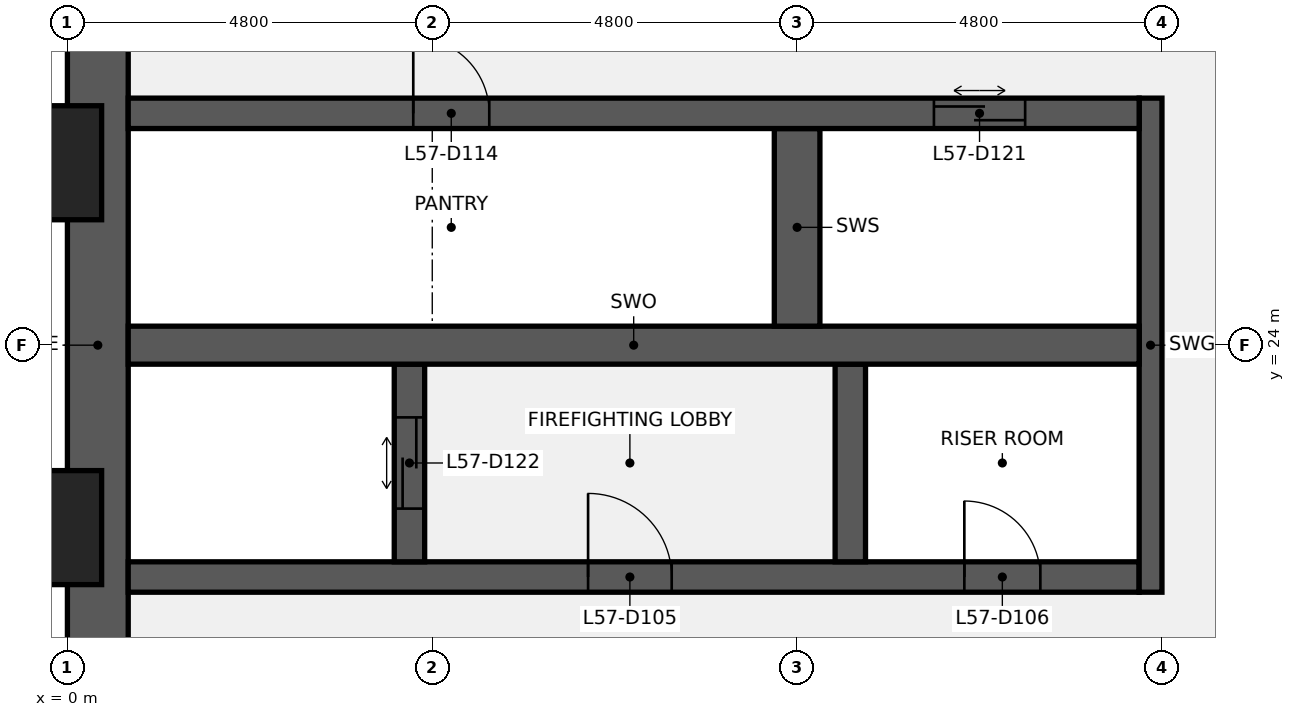
"""IFC4 building model, lengths in metres.
Left out: names, types, materials, properties, quantities, classifications, styles, units other than length and angle.
Written with IfcOpenShell. Run it as: python <this file> out.ifc"""

import sys

from ifc_helpers import new_model, si_unit, direction, frame, frame_2d, origin, origin_2d, place, context, subcontext, project, spatial, rectangle, extrude, element, fill, save


model = new_model("IFC4")
c1 = context("Model", 3, precision=1e-05, world=origin(), true_north=direction((0.0, 1.0)))
c2 = subcontext(c1, "Body", "Model", "MODEL_VIEW")
j1 = project(units=[si_unit("LENGTHUNIT", "METRE"), si_unit("PLANEANGLEUNIT", "RADIAN")], contexts=[c1])
p1 = place(None, origin())
s1 = spatial("IfcSite", under=j1, at=p1, CompositionType="ELEMENT")
p2 = place(p1, origin())
s2 = spatial("IfcBuilding", under=s1, at=p2, CompositionType="ELEMENT")
p3 = place(p2, frame((0.0, 0.0, 257.2)))
s3 = spatial("IfcBuildingStorey", under=s2, at=p3, CompositionType="ELEMENT", Elevation=257.2)
p4 = place(p3, frame((0.4, 9.6, 0.0), z_axis=(0.0, 0.0, 1.0), x_axis=(0.0, 1.0, 0.0)))
e1 = element("IfcWall", 1, at=p4, inside=s3, PredefinedType="SHEAR", context=c2, shape_type="SweptSolid", body=[
    extrude(rectangle(XDim=28.8, YDim=0.8, at=frame_2d((14.4, 0.0))), origin(), (0.0, 0.0, 1.0), 3.84),
])
p5 = place(p4, frame((8.85, 0.0, 0.9)))
e2 = element("IfcOpeningElement", 2, at=p5, cuts=e1, PredefinedType="OPENING", context=c2, shape_type="SweptSolid", body=[
    extrude(rectangle(XDim=1.5, YDim=1.5, at=frame_2d((0.75, 0.75))), frame((0.0, 0.41, 0.0), z_axis=(0.0, -1.0, 0.0), x_axis=(1.0, 0.0, 0.0)), (0.0, 0.0, 1.0), 0.82),
])
p6 = place(p4, frame((18.45, 0.0, 0.9)))
e3 = element("IfcOpeningElement", 3, at=p6, cuts=e1, PredefinedType="OPENING", context=c2, shape_type="SweptSolid", body=[
    extrude(rectangle(XDim=1.5, YDim=1.5, at=frame_2d((0.75, 0.75))), frame((0.0, 0.41, 0.0), z_axis=(0.0, -1.0, 0.0), x_axis=(1.0, 0.0, 0.0)), (0.0, 0.0, 1.0), 0.82),
])
p7 = place(p3, frame((0.8, 20.95, 0.0), z_axis=(0.0, 0.0, 1.0), x_axis=(1.0, 0.0, 0.0)))
e4 = element("IfcWall", 4, at=p7, inside=s3, PredefinedType="SHEAR", context=c2, shape_type="SweptSolid", body=[
    extrude(rectangle(XDim=13.3, YDim=0.4, at=frame_2d((6.65, 0.0))), origin(), (0.0, 0.0, 1.0), 3.84),
])
p8 = place(p7, frame((6.05, 0.0, 0.0)))
e5 = element("IfcOpeningElement", 5, at=p8, cuts=e4, PredefinedType="OPENING", context=c2, shape_type="SweptSolid", body=[
    extrude(rectangle(XDim=1.1, YDim=2.1, at=frame_2d((0.55, 1.05))), frame((0.0, 0.21, 0.0), z_axis=(0.0, -1.0, 0.0), x_axis=(1.0, 0.0, 0.0)), (0.0, 0.0, 1.0), 0.42),
])
p9 = place(p7, frame((11.0, 0.0, 0.0)))
e6 = element("IfcOpeningElement", 6, at=p9, cuts=e4, PredefinedType="OPENING", context=c2, shape_type="SweptSolid", body=[
    extrude(rectangle(XDim=1.0, YDim=2.1, at=frame_2d((0.5, 1.05))), frame((0.0, 0.21, 0.0), z_axis=(0.0, -1.0, 0.0), x_axis=(1.0, 0.0, 0.0)), (0.0, 0.0, 1.0), 0.42),
])
p10 = place(p3, frame((14.25, 20.75, 0.0), z_axis=(0.0, 0.0, 1.0), x_axis=(0.0, 1.0, 0.0)))
e7 = element("IfcWall", 7, at=p10, inside=s3, PredefinedType="SHEAR", context=c2, shape_type="SweptSolid", body=[
    extrude(rectangle(XDim=6.5, YDim=0.3, at=frame_2d((3.25, 0.0))), origin(), (0.0, 0.0, 1.0), 3.84),
])
p11 = place(p3, frame((4.5, 21.15, 0.0), z_axis=(0.0, 0.0, 1.0), x_axis=(0.0, 1.0, 0.0)))
e8 = element("IfcWall", 8, at=p11, inside=s3, PredefinedType="SHEAR", context=c2, shape_type="SweptSolid", body=[
    extrude(rectangle(XDim=2.6, YDim=0.4, at=frame_2d((1.3, 0.0))), origin(), (0.0, 0.0, 1.0), 3.84),
])
p12 = place(p11, frame((0.7, 0.0, 0.0)))
e9 = element("IfcOpeningElement", 9, at=p12, cuts=e8, PredefinedType="OPENING", context=c2, shape_type="SweptSolid", body=[
    extrude(rectangle(XDim=1.2, YDim=2.1, at=frame_2d((0.6, 1.05))), frame((0.0, 0.21, 0.0), z_axis=(0.0, -1.0, 0.0), x_axis=(1.0, 0.0, 0.0)), (0.0, 0.0, 1.0), 0.42),
])
p13 = place(p3, frame((10.3, 21.15, 0.0), z_axis=(0.0, 0.0, 1.0), x_axis=(0.0, 1.0, 0.0)))
e10 = element("IfcWall", 10, at=p13, inside=s3, PredefinedType="SHEAR", context=c2, shape_type="SweptSolid", body=[
    extrude(rectangle(XDim=2.6, YDim=0.4, at=frame_2d((1.3, 0.0))), origin(), (0.0, 0.0, 1.0), 3.84),
])
p14 = place(p3, frame((0.8, 24.0, 0.0), z_axis=(0.0, 0.0, 1.0), x_axis=(1.0, 0.0, 0.0)))
e11 = element("IfcWall", 11, at=p14, inside=s3, PredefinedType="SHEAR", context=c2, shape_type="SweptSolid", body=[
    extrude(rectangle(XDim=13.3, YDim=0.5, at=frame_2d((6.65, 0.0))), origin(), (0.0, 0.0, 1.0), 3.84),
])
p15 = place(p3, frame((9.6, 24.25, 0.0), z_axis=(0.0, 0.0, 1.0), x_axis=(0.0, 1.0, 0.0)))
e12 = element("IfcWall", 12, at=p15, inside=s3, PredefinedType="SHEAR", context=c2, shape_type="SweptSolid", body=[
    extrude(rectangle(XDim=2.6, YDim=0.6, at=frame_2d((1.3, 0.0))), origin(), (0.0, 0.0, 1.0), 3.84),
])
p16 = place(p3, frame((0.8, 27.05, 0.0), z_axis=(0.0, 0.0, 1.0), x_axis=(1.0, 0.0, 0.0)))
e13 = element("IfcWall", 13, at=p16, inside=s3, PredefinedType="SHEAR", context=c2, shape_type="SweptSolid", body=[
    extrude(rectangle(XDim=13.3, YDim=0.4, at=frame_2d((6.65, 0.0))), origin(), (0.0, 0.0, 1.0), 3.84),
])
p17 = place(p16, frame((3.75, 0.0, 0.0)))
e14 = element("IfcOpeningElement", 14, at=p17, cuts=e13, PredefinedType="OPENING", context=c2, shape_type="SweptSolid", body=[
    extrude(rectangle(XDim=1.0, YDim=2.1, at=frame_2d((0.5, 1.05))), frame((0.0, 0.21, 0.0), z_axis=(0.0, -1.0, 0.0), x_axis=(1.0, 0.0, 0.0)), (0.0, 0.0, 1.0), 0.42),
])
p18 = place(p16, frame((10.6, 0.0, 0.0)))
e15 = element("IfcOpeningElement", 15, at=p18, cuts=e13, PredefinedType="OPENING", context=c2, shape_type="SweptSolid", body=[
    extrude(rectangle(XDim=1.2, YDim=2.1, at=frame_2d((0.6, 1.05))), frame((0.0, 0.21, 0.0), z_axis=(0.0, -1.0, 0.0), x_axis=(1.0, 0.0, 0.0)), (0.0, 0.0, 1.0), 0.42),
])
for number, where, z_axis, x_axis in (
    (16, (-0.75, 21.6, 0.0), (0.0, 0.0, 1.0), (0.0, 1.0, 0.0)),
    (17, (-0.75, 26.4, 0.0), (0.0, 0.0, 1.0), (0.0, 1.0, 0.0)),
):
    element("IfcColumn", number, at=place(p3, frame(where, z_axis=z_axis, x_axis=x_axis)), inside=s3, PredefinedType="PILASTER", context=c2, shape_type="SweptSolid", body=[
        extrude(rectangle(XDim=2.4, YDim=1.5, at=origin_2d()), origin(), (0.0, 0.0, 1.0), 4.0),
    ])
p19 = place(p8, origin())
e18 = element("IfcDoor", 18, at=p19, inside=s3, OperationType="SINGLE_SWING_LEFT", PredefinedType="DOOR", context=c2, shape_type="SweptSolid", body=[
    extrude(rectangle(XDim=1.1, YDim=2.1, at=frame_2d((0.55, 1.05))), frame((0.0, 0.025, 0.0), z_axis=(0.0, -1.0, 0.0), x_axis=(1.0, 0.0, 0.0)), (0.0, 0.0, 1.0), 0.05),
])
fill(e5, e18)
p20 = place(p9, origin())
e19 = element("IfcDoor", 19, at=p20, inside=s3, OperationType="SINGLE_SWING_LEFT", PredefinedType="DOOR", context=c2, shape_type="SweptSolid", body=[
    extrude(rectangle(XDim=1.0, YDim=2.1, at=frame_2d((0.5, 1.05))), frame((0.0, 0.025, 0.0), z_axis=(0.0, -1.0, 0.0), x_axis=(1.0, 0.0, 0.0)), (0.0, 0.0, 1.0), 0.05),
])
fill(e6, e19)
p21 = place(p17, origin())
e20 = element("IfcDoor", 20, at=p21, inside=s3, OperationType="SINGLE_SWING_LEFT", PredefinedType="DOOR", context=c2, shape_type="SweptSolid", body=[
    extrude(rectangle(XDim=1.0, YDim=2.1, at=frame_2d((0.5, 1.05))), frame((0.0, 0.025, 0.0), z_axis=(0.0, -1.0, 0.0), x_axis=(1.0, 0.0, 0.0)), (0.0, 0.0, 1.0), 0.05),
])
fill(e14, e20)
p22 = place(p18, origin())
e21 = element("IfcDoor", 21, at=p22, inside=s3, OperationType="DOUBLE_DOOR_SLIDING", PredefinedType="DOOR", context=c2, shape_type="SweptSolid", body=[
    extrude(rectangle(XDim=1.2, YDim=2.1, at=frame_2d((0.6, 1.05))), frame((0.0, 0.025, 0.0), z_axis=(0.0, -1.0, 0.0), x_axis=(1.0, 0.0, 0.0)), (0.0, 0.0, 1.0), 0.05),
])
fill(e15, e21)
p23 = place(p12, origin())
e22 = element("IfcDoor", 22, at=p23, inside=s3, OperationType="DOUBLE_DOOR_SLIDING", PredefinedType="DOOR", context=c2, shape_type="SweptSolid", body=[
    extrude(rectangle(XDim=1.2, YDim=2.1, at=frame_2d((0.6, 1.05))), frame((0.0, 0.025, 0.0), z_axis=(0.0, -1.0, 0.0), x_axis=(1.0, 0.0, 0.0)), (0.0, 0.0, 1.0), 0.05),
])
fill(e9, e22)
save(model, sys.argv[1])
